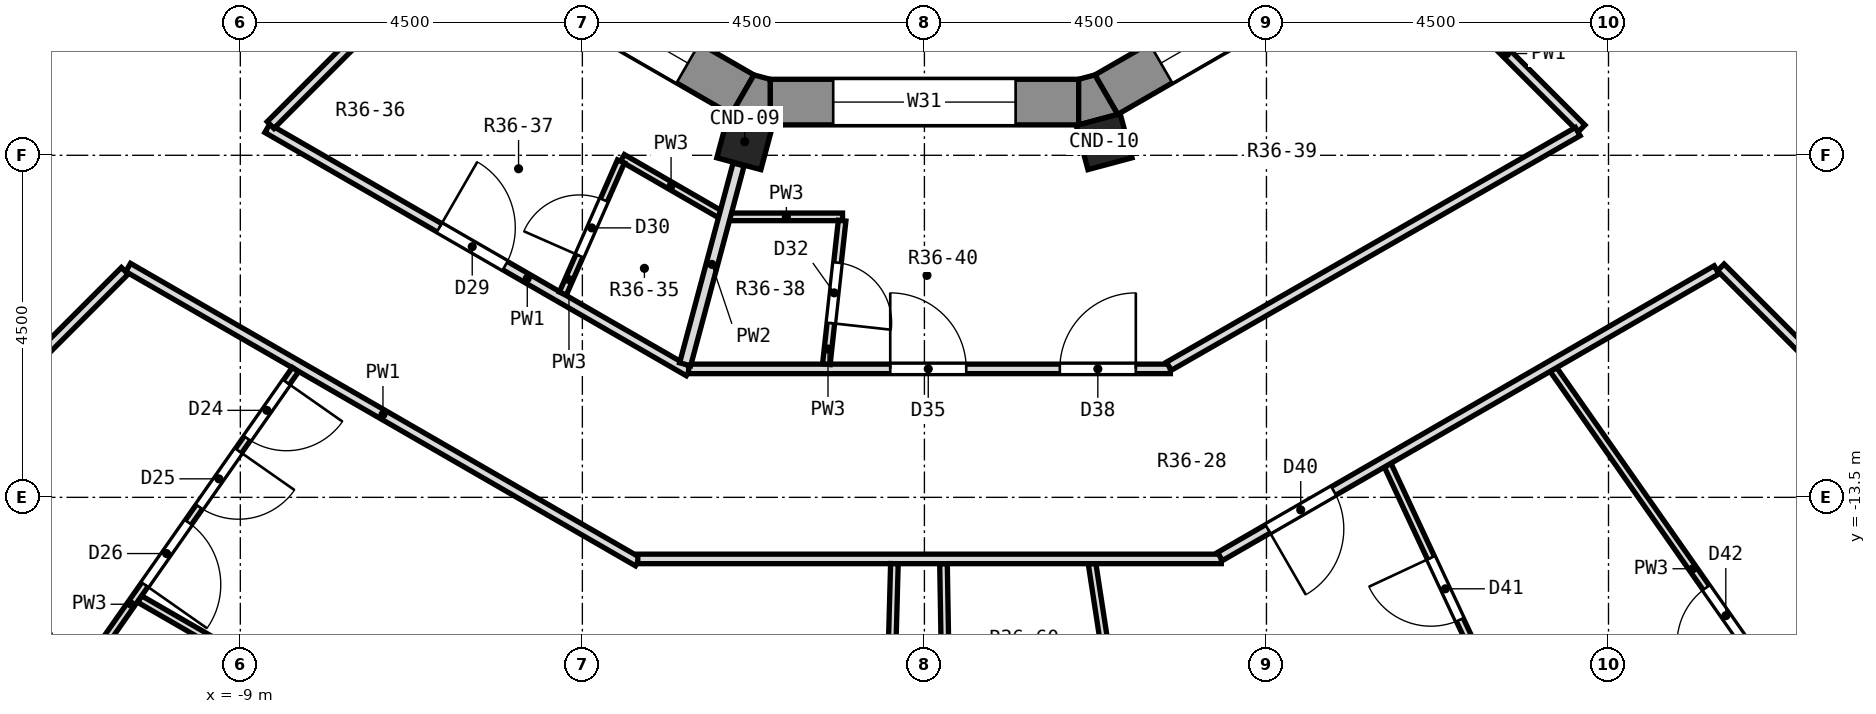
"""IFC4 building model, lengths in metres.
Left out: names, types, materials, properties, quantities, classifications, styles, units other than length and angle.
Written with IfcOpenShell. Run it as: python <this file> out.ifc"""

import sys

from ifc_helpers import new_model, si_unit, direction, frame, frame_2d, origin, origin_2d, place, context, subcontext, project, spatial, polyline, rectangle, outline, extrude, element, fill, save


model = new_model("IFC4")
c1 = context("Model", 3, precision=1e-05, world=origin(), true_north=direction((0.0, 1.0)))
c2 = subcontext(c1, "Body", "Model", "MODEL_VIEW")
j1 = project(units=[si_unit("LENGTHUNIT", "METRE"), si_unit("PLANEANGLEUNIT", "RADIAN")], contexts=[c1])
p1 = place(None, origin())
s1 = spatial("IfcSite", under=j1, at=p1, CompositionType="ELEMENT")
p2 = place(p1, origin())
s2 = spatial("IfcBuilding", under=s1, at=p2, CompositionType="ELEMENT")
p3 = place(p2, frame((0.0, 0.0, 259.4)))
s3 = spatial("IfcBuildingStorey", under=s2, at=p3, CompositionType="ELEMENT", Elevation=259.4)
for number, where, z_axis, x_axis in (
    (1, (-2.364, -8.821, 0.0), (0.0, 0.0, 1.0), (-0.259, -0.966, 0.0)),
    (2, (2.364, -8.821, 0.0), (0.0, 0.0, 1.0), (0.259, -0.966, 0.0)),
):
    element("IfcColumn", number, at=place(p3, frame(where, z_axis=z_axis, x_axis=x_axis)), inside=s3, PredefinedType="COLUMN", context=c2, shape_type="SweptSolid", body=[
        extrude(rectangle(XDim=0.6, YDim=0.6, at=origin_2d()), origin(), (0.0, 0.0, 1.0), 3.3),
    ])
p4 = place(p3, frame((-5.907, -6.173, 0.0), z_axis=(0.0, 0.0, 1.0), x_axis=(0.866028316509, -0.499994954979, 0.0)))
e3 = element("IfcWall", 3, at=p4, inside=s3, PredefinedType="SOLIDWALL", context=c2, shape_type="SweptSolid", body=[
    extrude(rectangle(XDim=4.059, YDim=0.6, at=frame_2d((2.029, 0.0))), origin(), (0.0, 0.0, 1.0), 2.9),
])
p5 = place(p4, frame((0.829, 0.0, 0.9)))
e4 = element("IfcOpeningElement", 4, at=p5, cuts=e3, PredefinedType="OPENING", context=c2, shape_type="SweptSolid", body=[
    extrude(rectangle(XDim=2.4, YDim=1.8, at=frame_2d((1.2, 0.9))), frame((0.0, 0.312, 0.0), z_axis=(0.0, -1.0, 0.0), x_axis=(1.0, 0.0, 0.0)), (0.0, 0.0, 1.0), 0.624),
])
p6 = place(p3, frame((-2.029, -8.3, 0.0), z_axis=(0.0, 0.0, 1.0), x_axis=(1.0, 0.0, 0.0)))
e5 = element("IfcWall", 5, at=p6, inside=s3, PredefinedType="SOLIDWALL", context=c2, shape_type="SweptSolid", body=[
    extrude(rectangle(XDim=4.059, YDim=0.6, at=frame_2d((2.029, 0.0))), origin(), (0.0, 0.0, 1.0), 2.9),
])
p7 = place(p6, frame((0.829, 0.0, 0.9)))
e6 = element("IfcOpeningElement", 6, at=p7, cuts=e5, PredefinedType="OPENING", context=c2, shape_type="SweptSolid", body=[
    extrude(rectangle(XDim=2.4, YDim=1.8, at=frame_2d((1.2, 0.9))), frame((0.0, 0.312, 0.0), z_axis=(0.0, -1.0, 0.0), x_axis=(1.0, 0.0, 0.0)), (0.0, 0.0, 1.0), 0.624),
])
p8 = place(p3, frame((2.393, -8.203, 0.0), z_axis=(0.0, 0.0, 1.0), x_axis=(0.866028316509, 0.499994954979, 0.0)))
e7 = element("IfcWall", 7, at=p8, inside=s3, PredefinedType="SOLIDWALL", context=c2, shape_type="SweptSolid", body=[
    extrude(rectangle(XDim=4.059, YDim=0.6, at=frame_2d((2.029, 0.0))), origin(), (0.0, 0.0, 1.0), 2.9),
])
p9 = place(p8, frame((0.829, 0.0, 0.9)))
e8 = element("IfcOpeningElement", 8, at=p9, cuts=e7, PredefinedType="OPENING", context=c2, shape_type="SweptSolid", body=[
    extrude(rectangle(XDim=2.4, YDim=1.8, at=frame_2d((1.2, 0.9))), frame((0.0, 0.312, 0.0), z_axis=(0.0, -1.0, 0.0), x_axis=(1.0, 0.0, 0.0)), (0.0, 0.0, 1.0), 0.624),
])
p10 = place(p3, origin())
e9 = element("IfcWall", 9, at=p10, inside=s3, PredefinedType="SOLIDWALL", context=c2, shape_type="SweptSolid", body=[
    extrude(outline(polyline([(-2.029, -8.6), (-2.029, -8.0), (-2.242, -7.943), (-2.542, -8.462), (-2.029, -8.6)])), origin(), (0.0, 0.0, 1.0), 2.9),
])
p11 = place(p3, origin())
e10 = element("IfcWall", 10, at=p11, inside=s3, PredefinedType="SOLIDWALL", context=c2, shape_type="SweptSolid", body=[
    extrude(outline(polyline([(2.542, -8.462), (2.242, -7.943), (2.029, -8.0), (2.029, -8.6), (2.542, -8.462)])), origin(), (0.0, 0.0, 1.0), 2.9),
])
p12 = place(p3, frame((0.251, -14.373, 0.0), z_axis=(0.0, 0.0, 1.0), x_axis=(0.017133494207, -0.999853210915, 0.0)))
e11 = element("IfcWall", 11, at=p12, inside=s3, PredefinedType="PARTITIONING", context=c2, shape_type="SweptSolid", body=[
    extrude(rectangle(XDim=2.038, YDim=0.1, at=frame_2d((1.019, 0.0))), origin(), (0.0, 0.0, 1.0), 2.9),
])
p13 = place(p3, frame((2.206, -14.372, 0.0), z_axis=(0.0, 0.0, 1.0), x_axis=(0.151514148926, -0.988455088851, 0.0)))
e12 = element("IfcWall", 12, at=p13, inside=s3, PredefinedType="PARTITIONING", context=c2, shape_type="SweptSolid", body=[
    extrude(rectangle(XDim=2.061, YDim=0.1, at=frame_2d((1.03, 0.0))), origin(), (0.0, 0.0, 1.0), 2.9),
])
p14 = place(p3, frame((6.095, -13.077, 0.0), z_axis=(0.0, 0.0, 1.0), x_axis=(0.422939739386, -0.906157810124, 0.0)))
e13 = element("IfcWall", 13, at=p14, inside=s3, PredefinedType="PARTITIONING", context=c2, shape_type="SweptSolid", body=[
    extrude(rectangle(XDim=7.388, YDim=0.1, at=frame_2d((3.694, 0.0))), origin(), (0.0, 0.0, 1.0), 2.9),
])
p15 = place(p14, frame((1.345, 0.0, 0.0)))
e14 = element("IfcOpeningElement", 14, at=p15, cuts=e13, PredefinedType="OPENING", context=c2, shape_type="SweptSolid", body=[
    extrude(rectangle(XDim=0.9, YDim=2.1, at=frame_2d((0.45, 1.05))), frame((0.0, 0.062, 0.0), z_axis=(0.0, -1.0, 0.0), x_axis=(1.0, 0.0, 0.0)), (0.0, 0.0, 1.0), 0.124),
])
p16 = place(p3, frame((8.275, -11.818, 0.0), z_axis=(0.0, 0.0, 1.0), x_axis=(0.573597629831, -0.819137204046, 0.0)))
e15 = element("IfcWall", 15, at=p16, inside=s3, PredefinedType="PARTITIONING", context=c2, shape_type="SweptSolid", body=[
    extrude(rectangle(XDim=7.388, YDim=0.1, at=frame_2d((3.694, 0.0))), origin(), (0.0, 0.0, 1.0), 2.9),
])
p17 = place(p16, frame((3.504, 0.0, 0.0)))
e16 = element("IfcOpeningElement", 16, at=p17, cuts=e15, PredefinedType="OPENING", context=c2, shape_type="SweptSolid", body=[
    extrude(rectangle(XDim=0.9, YDim=2.1, at=frame_2d((0.45, 1.05))), frame((0.0, 0.062, 0.0), z_axis=(0.0, -1.0, 0.0), x_axis=(1.0, 0.0, 0.0)), (0.0, 0.0, 1.0), 0.124),
])
p18 = place(p3, frame((6.677, -6.677, 0.0), z_axis=(0.0, 0.0, 1.0), x_axis=(0.707106781187, -0.707106781187, 0.0)))
e17 = element("IfcWall", 17, at=p18, inside=s3, PredefinedType="PARTITIONING", context=c2, shape_type="SweptSolid", body=[
    extrude(rectangle(XDim=2.785, YDim=0.125, at=frame_2d((1.393, 0.0))), origin(), (0.0, 0.0, 1.0), 2.9),
])
p19 = place(p3, frame((10.477, -10.475, 0.0), z_axis=(0.0, 0.0, 1.0), x_axis=(0.707106781187, -0.707106781187, 0.0)))
e18 = element("IfcWall", 18, at=p19, inside=s3, PredefinedType="PARTITIONING", context=c2, shape_type="SweptSolid", body=[
    extrude(rectangle(XDim=3.848, YDim=0.125, at=frame_2d((1.924, 0.0))), origin(), (0.0, 0.0, 1.0), 2.9),
])
p20 = place(p3, frame((-10.324, -14.838, 0.0), z_axis=(0.0, 0.0, 1.0), x_axis=(0.866035918664, -0.499981787252, 0.0)))
e19 = element("IfcWall", 19, at=p20, inside=s3, PredefinedType="PARTITIONING", context=c2, shape_type="SweptSolid", body=[
    extrude(rectangle(XDim=2.2, YDim=0.1, at=frame_2d((1.1, 0.0))), origin(), (0.0, 0.0, 1.0), 2.9),
])
p21 = place(p3, frame((-10.476, -10.476, 0.0), z_axis=(0.0, 0.0, 1.0), x_axis=(0.866073222863, -0.499917165778, 0.0)))
e20 = element("IfcWall", 20, at=p21, inside=s3, PredefinedType="PARTITIONING", context=c2, shape_type="SweptSolid", body=[
    extrude(rectangle(XDim=7.742, YDim=0.125, at=frame_2d((3.871, 0.0))), origin(), (0.0, 0.0, 1.0), 2.9),
])
p22 = place(p3, frame((-8.646, -8.646, 0.0), z_axis=(0.0, 0.0, 1.0), x_axis=(0.866085253322, -0.49989632323, 0.0)))
e21 = element("IfcWall", 21, at=p22, inside=s3, PredefinedType="PARTITIONING", context=c2, shape_type="SweptSolid", body=[
    extrude(rectangle(XDim=6.402, YDim=0.125, at=frame_2d((3.201, 0.0))), origin(), (0.0, 0.0, 1.0), 2.9),
])
p23 = place(p22, frame((2.614, 0.0, 0.0)))
e22 = element("IfcOpeningElement", 22, at=p23, cuts=e21, PredefinedType="OPENING", context=c2, shape_type="SweptSolid", body=[
    extrude(rectangle(XDim=1.0, YDim=2.1, at=frame_2d((0.5, 1.05))), frame((0.0, 0.074, 0.0), z_axis=(0.0, -1.0, 0.0), x_axis=(1.0, 0.0, 0.0)), (0.0, 0.0, 1.0), 0.149),
])
p24 = place(p3, frame((-3.972, -9.034, 0.0), z_axis=(0.0, 0.0, 1.0), x_axis=(0.865841190759, -0.500318930668, 0.0)))
e23 = element("IfcWall", 23, at=p24, inside=s3, PredefinedType="PARTITIONING", context=c2, shape_type="SweptSolid", body=[
    extrude(rectangle(XDim=1.476, YDim=0.1, at=frame_2d((0.738, 0.0))), origin(), (0.0, 0.0, 1.0), 2.9),
])
p25 = place(p3, frame((-3.771, -14.31, 0.0), z_axis=(0.0, 0.0, 1.0), x_axis=(1.0, 0.0, 0.0)))
e24 = element("IfcWall", 24, at=p25, inside=s3, PredefinedType="PARTITIONING", context=c2, shape_type="SweptSolid", body=[
    extrude(rectangle(XDim=7.677, YDim=0.125, at=frame_2d((3.838, 0.0))), origin(), (0.0, 0.0, 1.0), 2.9),
])
p26 = place(p3, frame((-3.102, -11.81, 0.0), z_axis=(0.0, 0.0, 1.0), x_axis=(1.0, 0.0, 0.0)))
e25 = element("IfcWall", 25, at=p26, inside=s3, PredefinedType="PARTITIONING", context=c2, shape_type="SweptSolid", body=[
    extrude(rectangle(XDim=6.338, YDim=0.125, at=frame_2d((3.169, 0.0))), origin(), (0.0, 0.0, 1.0), 2.9),
])
p27 = place(p26, frame((2.652, 0.0, 0.0)))
e26 = element("IfcOpeningElement", 26, at=p27, cuts=e25, PredefinedType="OPENING", context=c2, shape_type="SweptSolid", body=[
    extrude(rectangle(XDim=1.0, YDim=2.1, at=frame_2d((0.5, 1.05))), frame((0.0, 0.074, 0.0), z_axis=(0.0, -1.0, 0.0), x_axis=(1.0, 0.0, 0.0)), (0.0, 0.0, 1.0), 0.149),
])
p28 = place(p26, frame((4.883, 0.0, 0.0)))
e27 = element("IfcOpeningElement", 27, at=p28, cuts=e25, PredefinedType="OPENING", context=c2, shape_type="SweptSolid", body=[
    extrude(rectangle(XDim=1.0, YDim=2.1, at=frame_2d((0.5, 1.05))), frame((0.0, 0.074, 0.0), z_axis=(0.0, -1.0, 0.0), x_axis=(1.0, 0.0, 0.0)), (0.0, 0.0, 1.0), 0.149),
])
p29 = place(p3, frame((-2.554, -9.81, 0.0), z_axis=(0.0, 0.0, 1.0), x_axis=(1.0, 0.0, 0.0)))
e28 = element("IfcWall", 28, at=p29, inside=s3, PredefinedType="PARTITIONING", context=c2, shape_type="SweptSolid", body=[
    extrude(rectangle(XDim=1.477, YDim=0.1, at=frame_2d((0.739, 0.0))), origin(), (0.0, 0.0, 1.0), 2.9),
])
p30 = place(p3, frame((3.216, -11.775, 0.0), z_axis=(0.0, 0.0, 1.0), x_axis=(0.86736732566, 0.497668486422, 0.0)))
e29 = element("IfcWall", 29, at=p30, inside=s3, PredefinedType="PARTITIONING", context=c2, shape_type="SweptSolid", body=[
    extrude(rectangle(XDim=6.202, YDim=0.125, at=frame_2d((3.101, 0.0))), origin(), (0.0, 0.0, 1.0), 2.9),
])
p31 = place(p3, frame((3.888, -14.279, 0.0), z_axis=(0.0, 0.0, 1.0), x_axis=(0.866068111199, 0.499926021291, 0.0)))
e30 = element("IfcWall", 30, at=p31, inside=s3, PredefinedType="PARTITIONING", context=c2, shape_type="SweptSolid", body=[
    extrude(rectangle(XDim=7.544, YDim=0.125, at=frame_2d((3.772, 0.0))), origin(), (0.0, 0.0, 1.0), 2.9),
])
p32 = place(p31, frame((0.727, 0.0, 0.0)))
e31 = element("IfcOpeningElement", 31, at=p32, cuts=e30, PredefinedType="OPENING", context=c2, shape_type="SweptSolid", body=[
    extrude(rectangle(XDim=1.0, YDim=2.1, at=frame_2d((0.5, 1.05))), frame((0.0, 0.074, 0.0), z_axis=(0.0, -1.0, 0.0), x_axis=(1.0, 0.0, 0.0)), (0.0, 0.0, 1.0), 0.149),
])
p33 = place(p3, frame((-13.25, -13.25, 0.0), z_axis=(0.0, 0.0, 1.0), x_axis=(0.707106781187, 0.707106781187, 0.0)))
e32 = element("IfcWall", 32, at=p33, inside=s3, PredefinedType="PARTITIONING", context=c2, shape_type="SweptSolid", body=[
    extrude(rectangle(XDim=3.86, YDim=0.125, at=frame_2d((1.93, 0.0))), origin(), (0.0, 0.0, 1.0), 2.9),
])
p34 = place(p3, frame((-8.602, -8.602, 0.0), z_axis=(0.0, 0.0, 1.0), x_axis=(0.707106781187, 0.707106781187, 0.0)))
e33 = element("IfcWall", 33, at=p34, inside=s3, PredefinedType="PARTITIONING", context=c2, shape_type="SweptSolid", body=[
    extrude(rectangle(XDim=2.722, YDim=0.125, at=frame_2d((1.361, 0.0))), origin(), (0.0, 0.0, 1.0), 2.9),
])
p35 = place(p3, frame((-11.269, -16.094, 0.0), z_axis=(0.0, 0.0, 1.0), x_axis=(0.573597334784, 0.819137410651, 0.0)))
e34 = element("IfcWall", 34, at=p35, inside=s3, PredefinedType="PARTITIONING", context=c2, shape_type="SweptSolid", body=[
    extrude(rectangle(XDim=5.219, YDim=0.1, at=frame_2d((2.609, 0.0))), origin(), (0.0, 0.0, 1.0), 2.9),
])
p36 = place(p35, frame((4.114, 0.0, 0.0)))
e35 = element("IfcOpeningElement", 35, at=p36, cuts=e34, PredefinedType="OPENING", context=c2, shape_type="SweptSolid", body=[
    extrude(rectangle(XDim=0.9, YDim=2.1, at=frame_2d((0.45, 1.05))), frame((0.0, 0.062, 0.0), z_axis=(0.0, -1.0, 0.0), x_axis=(1.0, 0.0, 0.0)), (0.0, 0.0, 1.0), 0.124),
])
p37 = place(p35, frame((3.014, 0.0, 0.0)))
e36 = element("IfcOpeningElement", 36, at=p37, cuts=e34, PredefinedType="OPENING", context=c2, shape_type="SweptSolid", body=[
    extrude(rectangle(XDim=0.9, YDim=2.1, at=frame_2d((0.45, 1.05))), frame((0.0, 0.062, 0.0), z_axis=(0.0, -1.0, 0.0), x_axis=(1.0, 0.0, 0.0)), (0.0, 0.0, 1.0), 0.124),
])
p38 = place(p35, frame((1.764, 0.0, 0.0)))
e37 = element("IfcOpeningElement", 37, at=p38, cuts=e34, PredefinedType="OPENING", context=c2, shape_type="SweptSolid", body=[
    extrude(rectangle(XDim=1.0, YDim=2.1, at=frame_2d((0.5, 1.05))), frame((0.0, 0.062, 0.0), z_axis=(0.0, -1.0, 0.0), x_axis=(1.0, 0.0, 0.0)), (0.0, 0.0, 1.0), 0.124),
])
p39 = place(p3, frame((-4.757, -10.819, 0.0), z_axis=(0.0, 0.0, 1.0), x_axis=(0.402510340415, 0.915415438945, 0.0)))
e38 = element("IfcWall", 38, at=p39, inside=s3, PredefinedType="PARTITIONING", context=c2, shape_type="SweptSolid", body=[
    extrude(rectangle(XDim=1.9, YDim=0.1, at=frame_2d((0.95, 0.0))), origin(), (0.0, 0.0, 1.0), 2.9),
])
p40 = place(p39, frame((0.544, 0.0, 0.0)))
e39 = element("IfcOpeningElement", 39, at=p40, cuts=e38, PredefinedType="OPENING", context=c2, shape_type="SweptSolid", body=[
    extrude(rectangle(XDim=0.8, YDim=2.1, at=frame_2d((0.4, 1.05))), frame((0.0, 0.062, 0.0), z_axis=(0.0, -1.0, 0.0), x_axis=(1.0, 0.0, 0.0)), (0.0, 0.0, 1.0), 0.124),
])
p41 = place(p3, frame((-3.148, -11.75, 0.0), z_axis=(0.0, 0.0, 1.0), x_axis=(0.258438641581, 0.96602767483, 0.0)))
e40 = element("IfcWall", 40, at=p41, inside=s3, PredefinedType="PARTITIONING", context=c2, shape_type="SweptSolid", body=[
    extrude(rectangle(XDim=2.722, YDim=0.15, at=frame_2d((1.361, 0.0))), origin(), (0.0, 0.0, 1.0), 2.9),
])
p42 = place(p3, frame((-1.29, -11.748, 0.0), z_axis=(0.0, 0.0, 1.0), x_axis=(0.109373495701, 0.99400072356, 0.0)))
e41 = element("IfcWall", 41, at=p42, inside=s3, PredefinedType="PARTITIONING", context=c2, shape_type="SweptSolid", body=[
    extrude(rectangle(XDim=1.9, YDim=0.1, at=frame_2d((0.95, 0.0))), origin(), (0.0, 0.0, 1.0), 2.9),
])
p43 = place(p42, frame((0.543, 0.0, 0.0)))
e42 = element("IfcOpeningElement", 42, at=p43, cuts=e41, PredefinedType="OPENING", context=c2, shape_type="SweptSolid", body=[
    extrude(rectangle(XDim=0.8, YDim=2.1, at=frame_2d((0.4, 1.05))), frame((0.0, 0.062, 0.0), z_axis=(0.0, -1.0, 0.0), x_axis=(1.0, 0.0, 0.0)), (0.0, 0.0, 1.0), 0.124),
])
p44 = place(p3, frame((-0.494, -17.961, 0.0), z_axis=(0.0, 0.0, 1.0), x_axis=(0.027544314619, 0.999620583388, 0.0)))
e43 = element("IfcWall", 43, at=p44, inside=s3, PredefinedType="PARTITIONING", context=c2, shape_type="SweptSolid", body=[
    extrude(rectangle(XDim=3.59, YDim=0.1, at=frame_2d((1.795, 0.0))), origin(), (0.0, 0.0, 1.0), 2.9),
])
p45 = place(p44, frame((0.551, 0.0, 0.0)))
e44 = element("IfcOpeningElement", 44, at=p45, cuts=e43, PredefinedType="OPENING", context=c2, shape_type="SweptSolid", body=[
    extrude(rectangle(XDim=0.9, YDim=2.1, at=frame_2d((0.45, 1.05))), frame((0.0, 0.062, 0.0), z_axis=(0.0, -1.0, 0.0), x_axis=(1.0, 0.0, 0.0)), (0.0, 0.0, 1.0), 0.124),
])
p46 = place(p5, origin())
e45 = element("IfcWindow", 45, at=p46, inside=s3, PartitioningType="SINGLE_PANEL", PredefinedType="WINDOW", context=c2, shape_type="SweptSolid", body=[
    extrude(rectangle(XDim=2.4, YDim=1.8, at=frame_2d((1.2, 0.9))), frame((0.0, -0.12, 0.0), z_axis=(0.0, -1.0, 0.0), x_axis=(1.0, 0.0, 0.0)), (0.0, 0.0, 1.0), 0.06),
])
fill(e4, e45)
p47 = place(p7, origin())
e46 = element("IfcWindow", 46, at=p47, inside=s3, PartitioningType="SINGLE_PANEL", PredefinedType="WINDOW", context=c2, shape_type="SweptSolid", body=[
    extrude(rectangle(XDim=2.4, YDim=1.8, at=frame_2d((1.2, 0.9))), frame((0.0, -0.12, 0.0), z_axis=(0.0, -1.0, 0.0), x_axis=(1.0, 0.0, 0.0)), (0.0, 0.0, 1.0), 0.06),
])
fill(e6, e46)
p48 = place(p9, origin())
e47 = element("IfcWindow", 47, at=p48, inside=s3, PartitioningType="SINGLE_PANEL", PredefinedType="WINDOW", context=c2, shape_type="SweptSolid", body=[
    extrude(rectangle(XDim=2.4, YDim=1.8, at=frame_2d((1.2, 0.9))), frame((0.0, -0.12, 0.0), z_axis=(0.0, -1.0, 0.0), x_axis=(1.0, 0.0, 0.0)), (0.0, 0.0, 1.0), 0.06),
])
fill(e8, e47)
p49 = place(p36, frame((0.9, 0.0, 0.0), z_axis=(0.0, 0.0, 1.0), x_axis=(-1.0, 0.0, 0.0)))
e48 = element("IfcDoor", 48, at=p49, inside=s3, OperationType="SINGLE_SWING_LEFT", PredefinedType="DOOR", context=c2, shape_type="SweptSolid", body=[
    extrude(rectangle(XDim=0.9, YDim=2.1, at=frame_2d((0.45, 1.05))), frame((0.0, 0.025, 0.0), z_axis=(0.0, -1.0, 0.0), x_axis=(1.0, 0.0, 0.0)), (0.0, 0.0, 1.0), 0.05),
])
fill(e35, e48)
p50 = place(p37, frame((0.9, 0.0, 0.0), z_axis=(0.0, 0.0, 1.0), x_axis=(-1.0, 0.0, 0.0)))
e49 = element("IfcDoor", 49, at=p50, inside=s3, OperationType="SINGLE_SWING_LEFT", PredefinedType="DOOR", context=c2, shape_type="SweptSolid", body=[
    extrude(rectangle(XDim=0.9, YDim=2.1, at=frame_2d((0.45, 1.05))), frame((0.0, 0.025, 0.0), z_axis=(0.0, -1.0, 0.0), x_axis=(1.0, 0.0, 0.0)), (0.0, 0.0, 1.0), 0.05),
])
fill(e36, e49)
p51 = place(p38, frame((1.0, 0.0, 0.0), z_axis=(0.0, 0.0, 1.0), x_axis=(-1.0, 0.0, 0.0)))
e50 = element("IfcDoor", 50, at=p51, inside=s3, OperationType="SINGLE_SWING_RIGHT", PredefinedType="DOOR", context=c2, shape_type="SweptSolid", body=[
    extrude(rectangle(XDim=1.0, YDim=2.1, at=frame_2d((0.5, 1.05))), frame((0.0, 0.025, 0.0), z_axis=(0.0, -1.0, 0.0), x_axis=(1.0, 0.0, 0.0)), (0.0, 0.0, 1.0), 0.05),
])
fill(e37, e50)
p52 = place(p23, origin())
e51 = element("IfcDoor", 51, at=p52, inside=s3, OperationType="SINGLE_SWING_LEFT", PredefinedType="DOOR", context=c2, shape_type="SweptSolid", body=[
    extrude(rectangle(XDim=1.0, YDim=2.1, at=frame_2d((0.5, 1.05))), frame((0.0, 0.025, 0.0), z_axis=(0.0, -1.0, 0.0), x_axis=(1.0, 0.0, 0.0)), (0.0, 0.0, 1.0), 0.05),
])
fill(e22, e51)
p53 = place(p40, origin())
e52 = element("IfcDoor", 52, at=p53, inside=s3, OperationType="SINGLE_SWING_LEFT", PredefinedType="DOOR", context=c2, shape_type="SweptSolid", body=[
    extrude(rectangle(XDim=0.8, YDim=2.1, at=frame_2d((0.4, 1.05))), frame((0.0, 0.025, 0.0), z_axis=(0.0, -1.0, 0.0), x_axis=(1.0, 0.0, 0.0)), (0.0, 0.0, 1.0), 0.05),
])
fill(e39, e52)
p54 = place(p43, frame((0.8, 0.0, 0.0), z_axis=(0.0, 0.0, 1.0), x_axis=(-1.0, 0.0, 0.0)))
e53 = element("IfcDoor", 53, at=p54, inside=s3, OperationType="SINGLE_SWING_RIGHT", PredefinedType="DOOR", context=c2, shape_type="SweptSolid", body=[
    extrude(rectangle(XDim=0.8, YDim=2.1, at=frame_2d((0.4, 1.05))), frame((0.0, 0.025, 0.0), z_axis=(0.0, -1.0, 0.0), x_axis=(1.0, 0.0, 0.0)), (0.0, 0.0, 1.0), 0.05),
])
fill(e42, e53)
p55 = place(p27, origin())
e54 = element("IfcDoor", 54, at=p55, inside=s3, OperationType="SINGLE_SWING_LEFT", PredefinedType="DOOR", context=c2, shape_type="SweptSolid", body=[
    extrude(rectangle(XDim=1.0, YDim=2.1, at=frame_2d((0.5, 1.05))), frame((0.0, 0.025, 0.0), z_axis=(0.0, -1.0, 0.0), x_axis=(1.0, 0.0, 0.0)), (0.0, 0.0, 1.0), 0.05),
])
fill(e26, e54)
p56 = place(p28, origin())
e55 = element("IfcDoor", 55, at=p56, inside=s3, OperationType="SINGLE_SWING_RIGHT", PredefinedType="DOOR", context=c2, shape_type="SweptSolid", body=[
    extrude(rectangle(XDim=1.0, YDim=2.1, at=frame_2d((0.5, 1.05))), frame((0.0, 0.025, 0.0), z_axis=(0.0, -1.0, 0.0), x_axis=(1.0, 0.0, 0.0)), (0.0, 0.0, 1.0), 0.05),
])
fill(e27, e55)
p57 = place(p32, frame((1.0, 0.0, 0.0), z_axis=(0.0, 0.0, 1.0), x_axis=(-1.0, 0.0, 0.0)))
e56 = element("IfcDoor", 56, at=p57, inside=s3, OperationType="SINGLE_SWING_RIGHT", PredefinedType="DOOR", context=c2, shape_type="SweptSolid", body=[
    extrude(rectangle(XDim=1.0, YDim=2.1, at=frame_2d((0.5, 1.05))), frame((0.0, 0.025, 0.0), z_axis=(0.0, -1.0, 0.0), x_axis=(1.0, 0.0, 0.0)), (0.0, 0.0, 1.0), 0.05),
])
fill(e31, e56)
p58 = place(p15, frame((0.9, 0.0, 0.0), z_axis=(0.0, 0.0, 1.0), x_axis=(-1.0, 0.0, 0.0)))
e57 = element("IfcDoor", 57, at=p58, inside=s3, OperationType="SINGLE_SWING_RIGHT", PredefinedType="DOOR", context=c2, shape_type="SweptSolid", body=[
    extrude(rectangle(XDim=0.9, YDim=2.1, at=frame_2d((0.45, 1.05))), frame((0.0, 0.025, 0.0), z_axis=(0.0, -1.0, 0.0), x_axis=(1.0, 0.0, 0.0)), (0.0, 0.0, 1.0), 0.05),
])
fill(e14, e57)
p59 = place(p17, frame((0.9, 0.0, 0.0), z_axis=(0.0, 0.0, 1.0), x_axis=(-1.0, 0.0, 0.0)))
e58 = element("IfcDoor", 58, at=p59, inside=s3, OperationType="SINGLE_SWING_LEFT", PredefinedType="DOOR", context=c2, shape_type="SweptSolid", body=[
    extrude(rectangle(XDim=0.9, YDim=2.1, at=frame_2d((0.45, 1.05))), frame((0.0, 0.025, 0.0), z_axis=(0.0, -1.0, 0.0), x_axis=(1.0, 0.0, 0.0)), (0.0, 0.0, 1.0), 0.05),
])
fill(e16, e58)
save(model, sys.argv[1])
